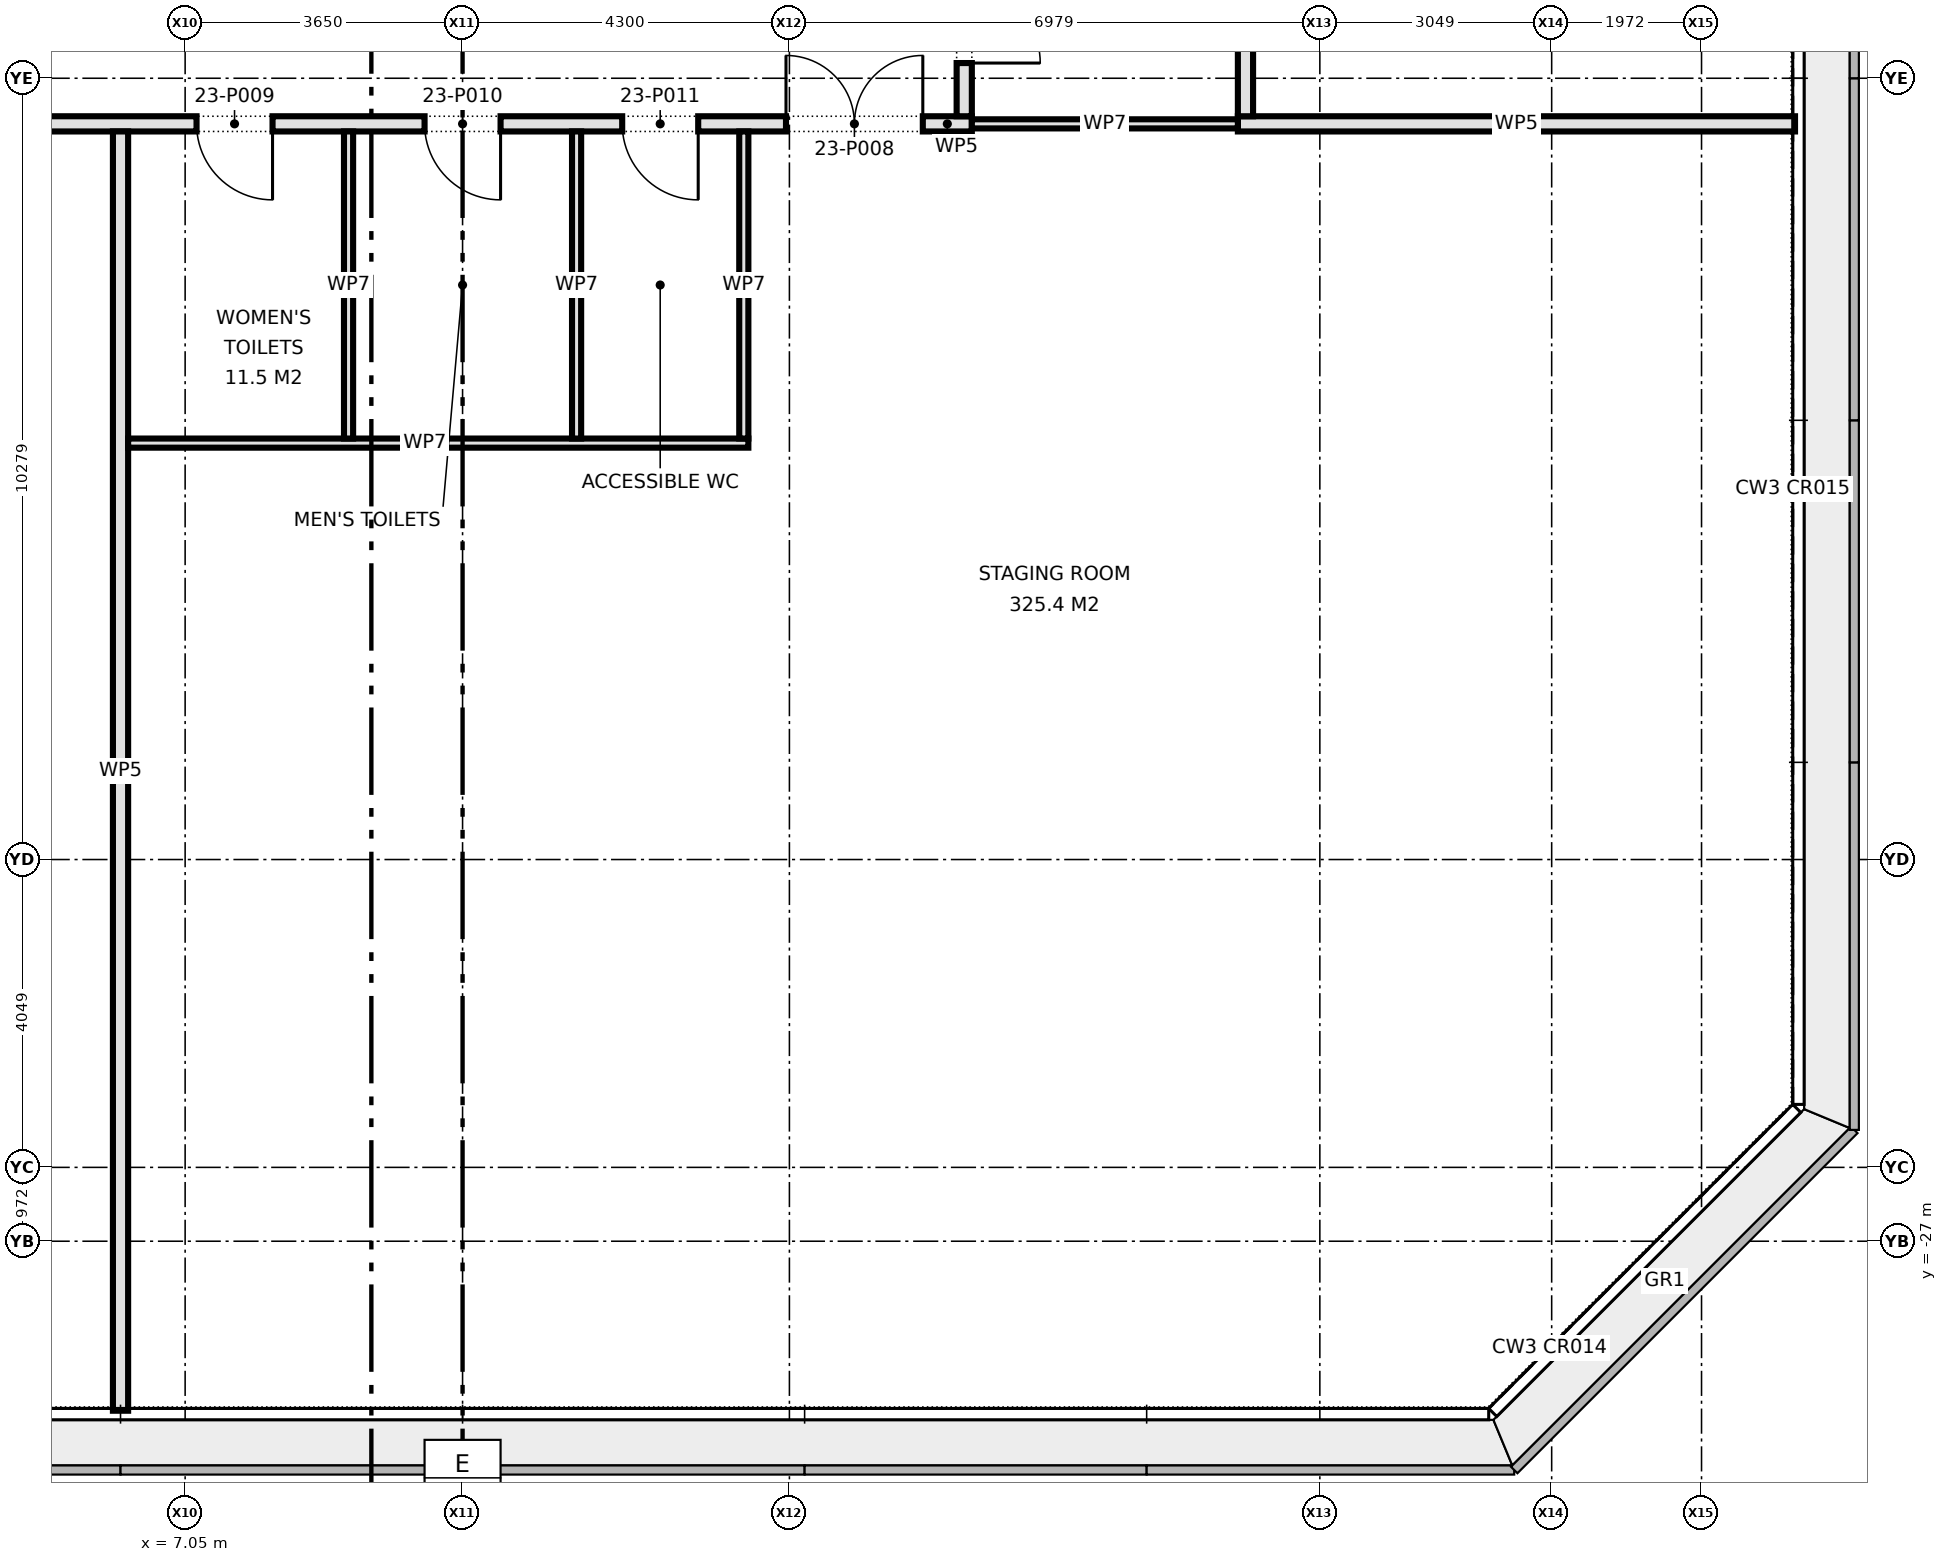
"""IFC4 building model, lengths in metres.
Left out: names, types, materials, properties, quantities, classifications, styles, units other than length and angle.
Written with IfcOpenShell. Run it as: python <this file> out.ifc"""

import sys

from ifc_helpers import new_model, si_unit, direction, frame, frame_2d, origin, place, context, subcontext, project, spatial, rectangle, extrude, element, fill, save


model = new_model("IFC4")
c1 = context("Model", 3, precision=1e-05, world=origin(), true_north=direction((0.0, 1.0)))
c2 = subcontext(c1, "Body", "Model", "MODEL_VIEW")
j1 = project(units=[si_unit("LENGTHUNIT", "METRE"), si_unit("PLANEANGLEUNIT", "RADIAN")], contexts=[c1])
p1 = place(None, origin())
s1 = spatial("IfcSite", under=j1, at=p1, CompositionType="ELEMENT")
p2 = place(p1, origin())
s2 = spatial("IfcBuilding", under=s1, at=p2, CompositionType="ELEMENT")
p3 = place(p2, frame((0.0, 0.0, 104.0)))
s3 = spatial("IfcBuildingStorey", under=s2, at=p3, CompositionType="ELEMENT", Elevation=104.0)
p4 = place(p3, frame((-20.33, -12.3, 0.0), z_axis=(0.0, 0.0, 1.0), x_axis=(1.0, 0.0, 0.0)))
e1 = element("IfcWall", 1, at=p4, inside=s3, PredefinedType="PARTITIONING", context=c2, shape_type="SweptSolid", body=[
    extrude(rectangle(XDim=37.73, YDim=0.2, at=frame_2d((18.865, 0.0))), origin(), (0.0, 0.0, 1.0), 4.2),
])
p5 = place(p4, frame((3.69, 0.0, 0.0)))
e2 = element("IfcOpeningElement", 2, at=p5, cuts=e1, PredefinedType="OPENING", context=c2, shape_type="SweptSolid", body=[
    extrude(rectangle(XDim=1.2, YDim=2.1, at=frame_2d((0.6, 1.05))), frame((0.0, 0.11, 0.0), z_axis=(0.0, -1.0, 0.0), x_axis=(1.0, 0.0, 0.0)), (0.0, 0.0, 1.0), 0.22),
])
p6 = place(p4, frame((12.13, 0.0, 0.0)))
e3 = element("IfcOpeningElement", 3, at=p6, cuts=e1, PredefinedType="OPENING", context=c2, shape_type="SweptSolid", body=[
    extrude(rectangle(XDim=1.8, YDim=2.1, at=frame_2d((0.9, 1.05))), frame((0.0, 0.11, 0.0), z_axis=(0.0, -1.0, 0.0), x_axis=(1.0, 0.0, 0.0)), (0.0, 0.0, 1.0), 0.22),
])
p7 = place(p4, frame((21.43, 0.0, 0.0)))
e4 = element("IfcOpeningElement", 4, at=p7, cuts=e1, PredefinedType="OPENING", context=c2, shape_type="SweptSolid", body=[
    extrude(rectangle(XDim=1.2, YDim=2.1, at=frame_2d((0.6, 1.05))), frame((0.0, 0.11, 0.0), z_axis=(0.0, -1.0, 0.0), x_axis=(1.0, 0.0, 0.0)), (0.0, 0.0, 1.0), 0.22),
])
p8 = place(p4, frame((35.285, 0.0, 0.0)))
e5 = element("IfcOpeningElement", 5, at=p8, cuts=e1, PredefinedType="OPENING", context=c2, shape_type="SweptSolid", body=[
    extrude(rectangle(XDim=1.8, YDim=2.1, at=frame_2d((0.9, 1.05))), frame((0.0, 0.11, 0.0), z_axis=(0.0, -1.0, 0.0), x_axis=(1.0, 0.0, 0.0)), (0.0, 0.0, 1.0), 0.22),
])
p9 = place(p4, frame((27.53, 0.0, 0.0)))
e6 = element("IfcOpeningElement", 6, at=p9, cuts=e1, PredefinedType="OPENING", context=c2, shape_type="SweptSolid", body=[
    extrude(rectangle(XDim=1.0, YDim=2.1, at=frame_2d((0.5, 1.05))), frame((0.0, 0.11, 0.0), z_axis=(0.0, -1.0, 0.0), x_axis=(1.0, 0.0, 0.0)), (0.0, 0.0, 1.0), 0.22),
])
p10 = place(p4, frame((30.53, 0.0, 0.0)))
e7 = element("IfcOpeningElement", 7, at=p10, cuts=e1, PredefinedType="OPENING", context=c2, shape_type="SweptSolid", body=[
    extrude(rectangle(XDim=1.0, YDim=2.1, at=frame_2d((0.5, 1.05))), frame((0.0, 0.11, 0.0), z_axis=(0.0, -1.0, 0.0), x_axis=(1.0, 0.0, 0.0)), (0.0, 0.0, 1.0), 0.22),
])
p11 = place(p4, frame((33.13, 0.0, 0.0)))
e8 = element("IfcOpeningElement", 8, at=p11, cuts=e1, PredefinedType="OPENING", context=c2, shape_type="SweptSolid", body=[
    extrude(rectangle(XDim=1.0, YDim=2.1, at=frame_2d((0.5, 1.05))), frame((0.0, 0.11, 0.0), z_axis=(0.0, -1.0, 0.0), x_axis=(1.0, 0.0, 0.0)), (0.0, 0.0, 1.0), 0.22),
])
p12 = place(p3, frame((20.9, -12.3, 0.0), z_axis=(0.0, 0.0, 1.0), x_axis=(1.0, 0.0, 0.0)))
e9 = element("IfcWall", 9, at=p12, inside=s3, PredefinedType="PARTITIONING", context=c2, shape_type="SweptSolid", body=[
    extrude(rectangle(XDim=7.33, YDim=0.2, at=frame_2d((3.665, 0.0))), origin(), (0.0, 0.0, 1.0), 4.2),
])
p13 = place(p3, frame((21.0, -12.2, 0.0), z_axis=(0.0, 0.0, 1.0), x_axis=(0.0, 1.0, 0.0)))
e10 = element("IfcWall", 10, at=p13, inside=s3, PredefinedType="PARTITIONING", context=c2, shape_type="SweptSolid", body=[
    extrude(rectangle(XDim=2.4, YDim=0.2, at=frame_2d((1.2, 0.0))), origin(), (0.0, 0.0, 1.0), 4.2),
])
p14 = place(p3, frame((17.3, -12.2, 0.0), z_axis=(0.0, 0.0, 1.0), x_axis=(0.0, 1.0, 0.0)))
e11 = element("IfcWall", 11, at=p14, inside=s3, PredefinedType="PARTITIONING", context=c2, shape_type="SweptSolid", body=[
    extrude(rectangle(XDim=24.4, YDim=0.2, at=frame_2d((12.2, 0.0))), origin(), (0.0, 0.0, 1.0), 4.2),
])
p15 = place(p14, frame((11.85, 0.0, 0.0)))
e12 = element("IfcOpeningElement", 12, at=p15, cuts=e11, PredefinedType="OPENING", context=c2, shape_type="SweptSolid", body=[
    extrude(rectangle(XDim=1.8, YDim=2.1, at=frame_2d((0.9, 1.05))), frame((0.0, 0.11, 0.0), z_axis=(0.0, -1.0, 0.0), x_axis=(1.0, 0.0, 0.0)), (0.0, 0.0, 1.0), 0.22),
])
p16 = place(p14, frame((0.7, 0.0, 0.0)))
e13 = element("IfcOpeningElement", 13, at=p16, cuts=e11, PredefinedType="OPENING", context=c2, shape_type="SweptSolid", body=[
    extrude(rectangle(XDim=1.0, YDim=2.1, at=frame_2d((0.5, 1.05))), frame((0.0, 0.11, 0.0), z_axis=(0.0, -1.0, 0.0), x_axis=(1.0, 0.0, 0.0)), (0.0, 0.0, 1.0), 0.22),
])
p17 = place(p3, frame((6.2, -29.23, 0.0), z_axis=(0.0, 0.0, 1.0), x_axis=(0.0, 1.0, 0.0)))
e14 = element("IfcWall", 14, at=p17, inside=s3, PredefinedType="PARTITIONING", context=c2, shape_type="SweptSolid", body=[
    extrude(rectangle(XDim=16.83, YDim=0.2, at=frame_2d((8.415, 0.0))), origin(), (0.0, 0.0, 1.0), 4.2),
])
p18 = place(p3, frame((6.3, -16.5, 0.0), z_axis=(0.0, 0.0, 1.0), x_axis=(1.0, 0.0, 0.0)))
e15 = element("IfcWall", 15, at=p18, inside=s3, PredefinedType="PARTITIONING", context=c2, shape_type="SweptSolid", body=[
    extrude(rectangle(XDim=8.16, YDim=0.12, at=frame_2d((4.08, 0.0))), origin(), (0.0, 0.0, 1.0), 4.2),
])
p19 = place(p3, frame((17.4, -12.3, 0.0), z_axis=(0.0, 0.0, 1.0), x_axis=(1.0, 0.0, 0.0)))
e16 = element("IfcWall", 16, at=p19, inside=s3, PredefinedType="PARTITIONING", context=c2, shape_type="SweptSolid", body=[
    extrude(rectangle(XDim=3.5, YDim=0.12, at=frame_2d((1.75, 0.0))), origin(), (0.0, 0.0, 1.0), 4.2),
])
for number, where, z_axis, x_axis in (
    (17, (14.4, -16.44, 0.0), (0.0, 0.0, 1.0), (0.0, 1.0, 0.0)),
    (18, (12.2, -16.44, 0.0), (0.0, 0.0, 1.0), (0.0, 1.0, 0.0)),
    (19, (9.2, -16.44, 0.0), (0.0, 0.0, 1.0), (0.0, 1.0, 0.0)),
):
    element("IfcWall", number, at=place(p3, frame(where, z_axis=z_axis, x_axis=x_axis)), inside=s3, PredefinedType="PARTITIONING", context=c2, shape_type="SweptSolid", body=[
        extrude(rectangle(XDim=4.04, YDim=0.12, at=frame_2d((2.02, 0.0))), origin(), (0.0, 0.0, 1.0), 4.2),
    ])
p20 = place(p8, origin())
e20 = element("IfcDoor", 20, at=p20, inside=s3, OperationType="DOUBLE_DOOR_SINGLE_SWING", PredefinedType="DOOR", context=c2, shape_type="SweptSolid", body=[
    extrude(rectangle(XDim=1.8, YDim=2.1, at=frame_2d((0.9, 1.05))), frame((0.0, 0.025, 0.0), z_axis=(0.0, -1.0, 0.0), x_axis=(1.0, 0.0, 0.0)), (0.0, 0.0, 1.0), 0.05),
])
fill(e5, e20)
p21 = place(p9, frame((1.0, 0.0, 0.0), z_axis=(0.0, 0.0, 1.0), x_axis=(-1.0, 0.0, 0.0)))
e21 = element("IfcDoor", 21, at=p21, inside=s3, OperationType="SINGLE_SWING_LEFT", PredefinedType="DOOR", context=c2, shape_type="SweptSolid", body=[
    extrude(rectangle(XDim=1.0, YDim=2.1, at=frame_2d((0.5, 1.05))), frame((0.0, 0.025, 0.0), z_axis=(0.0, -1.0, 0.0), x_axis=(1.0, 0.0, 0.0)), (0.0, 0.0, 1.0), 0.05),
])
fill(e6, e21)
p22 = place(p10, frame((1.0, 0.0, 0.0), z_axis=(0.0, 0.0, 1.0), x_axis=(-1.0, 0.0, 0.0)))
e22 = element("IfcDoor", 22, at=p22, inside=s3, OperationType="SINGLE_SWING_LEFT", PredefinedType="DOOR", context=c2, shape_type="SweptSolid", body=[
    extrude(rectangle(XDim=1.0, YDim=2.1, at=frame_2d((0.5, 1.05))), frame((0.0, 0.025, 0.0), z_axis=(0.0, -1.0, 0.0), x_axis=(1.0, 0.0, 0.0)), (0.0, 0.0, 1.0), 0.05),
])
fill(e7, e22)
p23 = place(p11, frame((1.0, 0.0, 0.0), z_axis=(0.0, 0.0, 1.0), x_axis=(-1.0, 0.0, 0.0)))
e23 = element("IfcDoor", 23, at=p23, inside=s3, OperationType="SINGLE_SWING_LEFT", PredefinedType="DOOR", context=c2, shape_type="SweptSolid", body=[
    extrude(rectangle(XDim=1.0, YDim=2.1, at=frame_2d((0.5, 1.05))), frame((0.0, 0.025, 0.0), z_axis=(0.0, -1.0, 0.0), x_axis=(1.0, 0.0, 0.0)), (0.0, 0.0, 1.0), 0.05),
])
fill(e8, e23)
p24 = place(p16, frame((1.0, 0.0, 0.0), z_axis=(0.0, 0.0, 1.0), x_axis=(-1.0, 0.0, 0.0)))
e24 = element("IfcDoor", 24, at=p24, inside=s3, OperationType="SINGLE_SWING_RIGHT", PredefinedType="DOOR", context=c2, shape_type="SweptSolid", body=[
    extrude(rectangle(XDim=1.0, YDim=2.1, at=frame_2d((0.5, 1.05))), frame((0.0, 0.025, 0.0), z_axis=(0.0, -1.0, 0.0), x_axis=(1.0, 0.0, 0.0)), (0.0, 0.0, 1.0), 0.05),
])
fill(e13, e24)
save(model, sys.argv[1])
